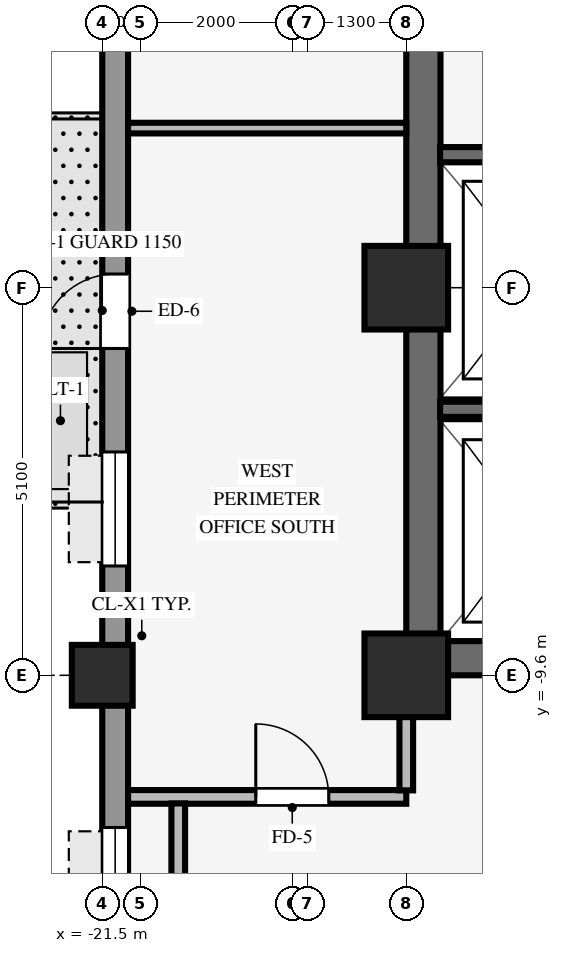
"""IFC4 building model, lengths in metres.
Left out: names, types, materials, properties, quantities, classifications, styles, units other than length and angle.
Written with IfcOpenShell. Run it as: python <this file> out.ifc"""

import sys

from ifc_helpers import new_model, si_unit, direction, frame, frame_2d, origin, origin_2d, place, context, subcontext, project, spatial, rectangle, hollow_rectangle, extrude, source, transform, mapped, element, fill, save


model = new_model("IFC4")
c1 = context("Model", 3, precision=1e-05, world=origin(), true_north=direction((0.0, 1.0)))
c2 = subcontext(c1, "Body", "Model", "MODEL_VIEW")
j1 = project(units=[si_unit("LENGTHUNIT", "METRE"), si_unit("PLANEANGLEUNIT", "RADIAN")], contexts=[c1])
p1 = place(None, origin())
s1 = spatial("IfcSite", under=j1, at=p1, CompositionType="ELEMENT")
p2 = place(p1, origin())
s2 = spatial("IfcBuilding", under=s1, at=p2, CompositionType="ELEMENT")
p3 = place(p2, frame((0.0, 0.0, 71.4)))
s3 = spatial("IfcBuildingStorey", under=s2, at=p3, CompositionType="ELEMENT", Elevation=71.4)
p4 = place(p3, frame((-17.5, -9.375, 0.0), z_axis=(0.0, 0.0, 1.0), x_axis=(1.0, 0.0, 0.0)))
e1 = element("IfcWall", 1, at=p4, inside=s3, PredefinedType="SHEAR", context=c2, shape_type="SweptSolid", body=[
    extrude(rectangle(XDim=8.5, YDim=0.45, at=frame_2d((4.25, 0.0))), origin(), (0.0, 0.0, 1.0), 3.37),
])
p5 = place(p3, frame((-17.275, -9.155, 0.0), z_axis=(0.0, 0.0, 1.0), x_axis=(0.0, 1.0, 0.0)))
e2 = element("IfcWall", 2, at=p5, inside=s3, PredefinedType="SHEAR", context=c2, shape_type="SweptSolid", body=[
    extrude(rectangle(XDim=18.31, YDim=0.45, at=frame_2d((9.155, 0.0))), origin(), (0.0, 0.0, 1.0), 3.37),
])
for number, where, z_axis, x_axis in (
    (3, (-17.5, -9.6, 0.0), (0.0, 0.0, 1.0), (1.0, 0.0, 0.0)),
    (4, (-17.5, -4.5, 0.0), (0.0, 0.0, 1.0), (1.0, 0.0, 0.0)),
):
    element("IfcColumn", number, at=place(p3, frame(where, z_axis=z_axis, x_axis=x_axis)), inside=s3, PredefinedType="COLUMN", context=c2, shape_type="SweptSolid", body=[
        extrude(rectangle(XDim=1.1, YDim=1.1, at=origin_2d()), origin(), (0.0, 0.0, 1.0), 3.37),
    ])
p6 = place(p3, frame((-21.5, -9.6, 0.0), z_axis=(0.0, 0.0, 1.0), x_axis=(1.0, 0.0, 0.0)))
e5 = element("IfcColumn", 5, at=p6, inside=s3, PredefinedType="COLUMN", context=c2, shape_type="SweptSolid", body=[
    extrude(hollow_rectangle(XDim=0.8, YDim=0.8, WallThickness=0.055, InnerFilletRadius=0.055, OuterFilletRadius=0.11, at=origin_2d()), origin(), (0.0, 0.0, 1.0), 3.37),
])
p7 = place(p3, frame((-21.33, -20.764, 0.0), z_axis=(0.0, 0.0, 1.0), x_axis=(0.0, 1.0, 0.0)))
e6 = element("IfcWall", 6, at=p7, inside=s3, PredefinedType="STANDARD", context=c2, shape_type="SweptSolid", body=[
    extrude(rectangle(XDim=41.528, YDim=0.34, at=frame_2d((20.764, 0.0))), origin(), (0.0, 0.0, 1.0), 2.705),
])
p8 = place(p7, frame((15.464, 0.0, 0.0)))
e7 = element("IfcOpeningElement", 7, at=p8, cuts=e6, PredefinedType="OPENING", context=c2, shape_type="SweptSolid", body=[
    extrude(rectangle(XDim=0.98, YDim=2.15, at=frame_2d((0.49, 1.075))), frame((0.0, 0.18, 0.0), z_axis=(0.0, -1.0, 0.0), x_axis=(1.0, 0.0, 0.0)), (0.0, 0.0, 1.0), 0.36),
])
p9 = place(p7, frame((1.371, 0.0, 0.8)))
e8 = element("IfcOpeningElement", 8, at=p9, cuts=e6, PredefinedType="OPENING", context=c2, shape_type="SweptSolid", body=[
    extrude(rectangle(XDim=1.5, YDim=1.6, at=frame_2d((0.75, 0.8))), frame((0.0, 0.18, 0.0), z_axis=(0.0, -1.0, 0.0), x_axis=(1.0, 0.0, 0.0)), (0.0, 0.0, 1.0), 0.36),
])
p10 = place(p7, frame((7.662, 0.0, 0.8)))
e9 = element("IfcOpeningElement", 9, at=p10, cuts=e6, PredefinedType="OPENING", context=c2, shape_type="SweptSolid", body=[
    extrude(rectangle(XDim=1.5, YDim=1.6, at=frame_2d((0.75, 0.8))), frame((0.0, 0.18, 0.0), z_axis=(0.0, -1.0, 0.0), x_axis=(1.0, 0.0, 0.0)), (0.0, 0.0, 1.0), 0.36),
])
p11 = place(p7, frame((12.603, 0.0, 0.8)))
e10 = element("IfcOpeningElement", 10, at=p11, cuts=e6, PredefinedType="OPENING", context=c2, shape_type="SweptSolid", body=[
    extrude(rectangle(XDim=1.5, YDim=1.6, at=frame_2d((0.75, 0.8))), frame((0.0, 0.18, 0.0), z_axis=(0.0, -1.0, 0.0), x_axis=(1.0, 0.0, 0.0)), (0.0, 0.0, 1.0), 0.36),
])
p12 = place(p7, frame((22.485, 0.0, 0.8)))
e11 = element("IfcOpeningElement", 11, at=p12, cuts=e6, PredefinedType="OPENING", context=c2, shape_type="SweptSolid", body=[
    extrude(rectangle(XDim=1.5, YDim=1.6, at=frame_2d((0.75, 0.8))), frame((0.0, 0.18, 0.0), z_axis=(0.0, -1.0, 0.0), x_axis=(1.0, 0.0, 0.0)), (0.0, 0.0, 1.0), 0.36),
])
p13 = place(p7, frame((27.426, 0.0, 0.8)))
e12 = element("IfcOpeningElement", 12, at=p13, cuts=e6, PredefinedType="OPENING", context=c2, shape_type="SweptSolid", body=[
    extrude(rectangle(XDim=1.5, YDim=1.6, at=frame_2d((0.75, 0.8))), frame((0.0, 0.18, 0.0), z_axis=(0.0, -1.0, 0.0), x_axis=(1.0, 0.0, 0.0)), (0.0, 0.0, 1.0), 0.36),
])
p14 = place(p7, frame((32.366, 0.0, 0.8)))
e13 = element("IfcOpeningElement", 13, at=p14, cuts=e6, PredefinedType="OPENING", context=c2, shape_type="SweptSolid", body=[
    extrude(rectangle(XDim=1.5, YDim=1.6, at=frame_2d((0.75, 0.8))), frame((0.0, 0.18, 0.0), z_axis=(0.0, -1.0, 0.0), x_axis=(1.0, 0.0, 0.0)), (0.0, 0.0, 1.0), 0.36),
])
p15 = place(p7, frame((38.657, 0.0, 0.8)))
e14 = element("IfcOpeningElement", 14, at=p15, cuts=e6, PredefinedType="OPENING", context=c2, shape_type="SweptSolid", body=[
    extrude(rectangle(XDim=1.5, YDim=1.6, at=frame_2d((0.75, 0.8))), frame((0.0, 0.18, 0.0), z_axis=(0.0, -1.0, 0.0), x_axis=(1.0, 0.0, 0.0)), (0.0, 0.0, 1.0), 0.36),
])
p16 = place(p3, frame((-17.055, -6.1, 0.0), z_axis=(0.0, 0.0, 1.0), x_axis=(1.0, 0.0, 0.0)))
e15 = element("IfcWall", 15, at=p16, inside=s3, PredefinedType="SHEAR", context=c2, shape_type="SweptSolid", body=[
    extrude(rectangle(XDim=2.805, YDim=0.2, at=frame_2d((1.402, 0.0))), origin(), (0.0, 0.0, 1.0), 3.37),
])
p17 = place(p3, frame((-17.055, -2.75, 0.0), z_axis=(0.0, 0.0, 1.0), x_axis=(1.0, 0.0, 0.0)))
e16 = element("IfcWall", 16, at=p17, inside=s3, PredefinedType="SHEAR", context=c2, shape_type="SweptSolid", body=[
    extrude(rectangle(XDim=2.61, YDim=0.2, at=frame_2d((1.305, 0.0))), origin(), (0.0, 0.0, 1.0), 3.37),
])
p18 = place(p3, frame((-21.16, -11.2, 0.0), z_axis=(0.0, 0.0, 1.0), x_axis=(1.0, 0.0, 0.0)))
e17 = element("IfcWall", 17, at=p18, inside=s3, PredefinedType="PARTITIONING", context=c2, shape_type="SweptSolid", body=[
    extrude(rectangle(XDim=3.66, YDim=0.18, at=frame_2d((1.83, 0.0))), origin(), (0.0, 0.0, 1.0), 3.36),
])
p19 = place(p18, frame((1.68, 0.0, 0.0)))
e18 = element("IfcOpeningElement", 18, at=p19, cuts=e17, PredefinedType="OPENING", context=c2, shape_type="SweptSolid", body=[
    extrude(rectangle(XDim=0.96, YDim=2.1, at=frame_2d((0.48, 1.05))), frame((0.0, 0.1, 0.0), z_axis=(0.0, -1.0, 0.0), x_axis=(1.0, 0.0, 0.0)), (0.0, 0.0, 1.0), 0.2),
])
p20 = place(p3, frame((-21.16, -2.4, 0.0), z_axis=(0.0, 0.0, 1.0), x_axis=(1.0, 0.0, 0.0)))
e19 = element("IfcWall", 19, at=p20, inside=s3, PredefinedType="PARTITIONING", context=c2, shape_type="SweptSolid", body=[
    extrude(rectangle(XDim=3.66, YDim=0.14, at=frame_2d((1.83, 0.0))), origin(), (0.0, 0.0, 1.0), 3.36),
])
p21 = place(p3, frame((-20.5, -13.514, 0.0), z_axis=(0.0, 0.0, 1.0), x_axis=(0.0, 1.0, 0.0)))
e20 = element("IfcWall", 20, at=p21, inside=s3, PredefinedType="PARTITIONING", context=c2, shape_type="SweptSolid", body=[
    extrude(rectangle(XDim=2.228, YDim=0.18, at=frame_2d((1.114, 0.0))), origin(), (0.0, 0.0, 1.0), 3.36),
])
p22 = place(p3, frame((-17.5, -11.114, 0.0), z_axis=(0.0, 0.0, 1.0), x_axis=(0.0, 1.0, 0.0)))
e21 = element("IfcWall", 21, at=p22, inside=s3, PredefinedType="PARTITIONING", context=c2, shape_type="SweptSolid", body=[
    extrude(rectangle(XDim=0.968, YDim=0.18, at=frame_2d((0.484, 0.0))), origin(), (0.0, 0.0, 1.0), 2.738),
])
m1 = source(origin(), c2, "Body", "SweptSolid", [
    extrude(rectangle(XDim=0.98, YDim=2.15, at=frame_2d((0.49, 1.075))), frame((0.0, 0.025, 0.0), z_axis=(0.0, -1.0, 0.0), x_axis=(1.0, 0.0, 0.0)), (0.0, 0.0, 1.0), 0.05),
])
p23 = place(p8, origin())
e22 = element("IfcDoor", 22, at=p23, inside=s3, OperationType="SINGLE_SWING_LEFT", PredefinedType="DOOR", context=c2, shape_type="MappedRepresentation", body=[
    mapped(m1, transform((0.0, 0.0, 0.0), scale=1.0)),
])
fill(e7, e22)
m2 = source(origin(), c2, "Body", "SweptSolid", [
    extrude(rectangle(XDim=1.5, YDim=1.6, at=frame_2d((0.75, 0.8))), frame((0.0, 0.03, 0.0), z_axis=(0.0, -1.0, 0.0), x_axis=(1.0, 0.0, 0.0)), (0.0, 0.0, 1.0), 0.06),
])
p24 = place(p10, origin())
e23 = element("IfcWindow", 23, at=p24, inside=s3, PartitioningType="SINGLE_PANEL", PredefinedType="WINDOW", context=c2, shape_type="MappedRepresentation", body=[
    mapped(m2, transform((0.0, 0.0, 0.0), scale=1.0)),
])
fill(e9, e23)
p25 = place(p11, origin())
e24 = element("IfcWindow", 24, at=p25, inside=s3, PartitioningType="SINGLE_PANEL", PredefinedType="WINDOW", context=c2, shape_type="MappedRepresentation", body=[
    mapped(m2, transform((0.0, 0.0, 0.0), scale=1.0)),
])
fill(e10, e24)
m3 = source(origin(), c2, "Body", "SweptSolid", [
    extrude(rectangle(XDim=0.96, YDim=2.1, at=frame_2d((0.48, 1.05))), frame((0.0, 0.025, 0.0), z_axis=(0.0, -1.0, 0.0), x_axis=(1.0, 0.0, 0.0)), (0.0, 0.0, 1.0), 0.05),
])
p26 = place(p19, origin())
e25 = element("IfcDoor", 25, at=p26, inside=s3, OperationType="SINGLE_SWING_LEFT", PredefinedType="DOOR", context=c2, shape_type="MappedRepresentation", body=[
    mapped(m3, transform((0.0, 0.0, 0.0), scale=1.0)),
])
fill(e18, e25)
save(model, sys.argv[1])
